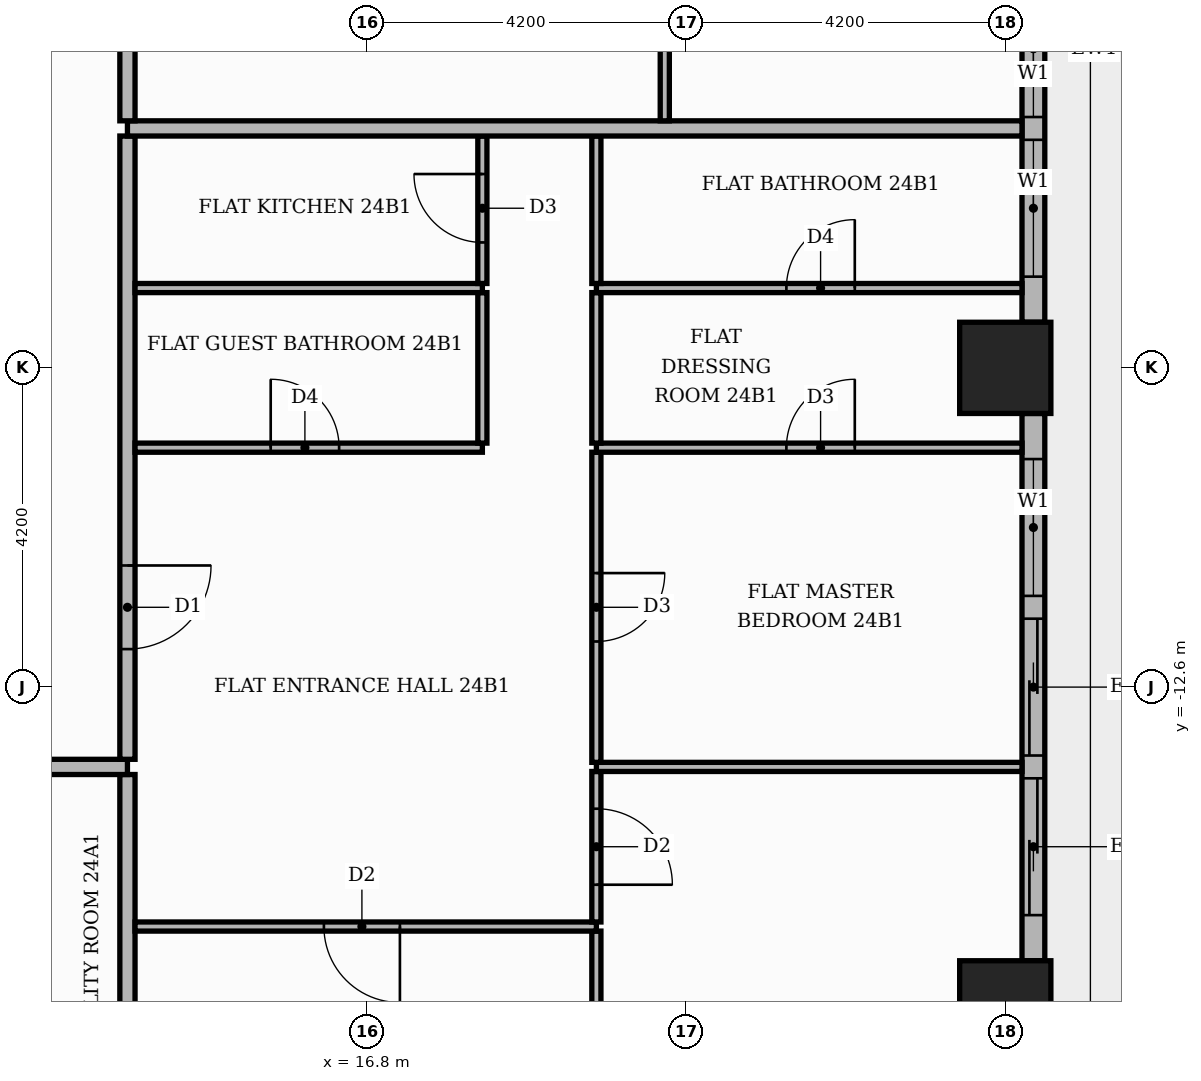
"""IFC4 building model, lengths in metres.
Left out: names, types, materials, properties, quantities, classifications, styles, units other than length and angle.
Written with IfcOpenShell. Run it as: python <this file> out.ifc"""

import sys

from ifc_helpers import new_model, si_unit, direction, frame, frame_2d, origin, origin_2d, place, context, subcontext, project, spatial, rectangle, extrude, element, fill, save


model = new_model("IFC4")
c1 = context("Model", 3, precision=1e-05, world=origin(), true_north=direction((0.0, 1.0)))
c2 = subcontext(c1, "Body", "Model", "MODEL_VIEW")
j1 = project(units=[si_unit("LENGTHUNIT", "METRE"), si_unit("PLANEANGLEUNIT", "RADIAN")], contexts=[c1])
p1 = place(None, origin())
s1 = spatial("IfcSite", under=j1, at=p1, CompositionType="ELEMENT")
p2 = place(p1, origin())
s2 = spatial("IfcBuilding", under=s1, at=p2, CompositionType="ELEMENT")
p3 = place(p2, frame((0.0, 0.0, 102.6)))
s3 = spatial("IfcBuildingStorey", under=s2, at=p3, CompositionType="ELEMENT", Elevation=102.6)
for number, where, z_axis, x_axis in (
    (1, (25.2, -8.4, 0.0), (0.0, 0.0, 1.0), (1.0, 0.0, 0.0)),
    (2, (25.2, -16.8, 0.0), (0.0, 0.0, 1.0), (1.0, 0.0, 0.0)),
):
    element("IfcColumn", number, at=place(p3, frame(where, z_axis=z_axis, x_axis=x_axis)), inside=s3, PredefinedType="COLUMN", context=c2, shape_type="SweptSolid", body=[
        extrude(rectangle(XDim=1.2, YDim=1.2, at=origin_2d()), origin(), (0.0, 0.0, 1.0), 3.9),
    ])
p4 = place(p3, frame((25.57, -16.2, 0.0), z_axis=(0.0, 0.0, 1.0), x_axis=(0.0, 1.0, 0.0)))
e3 = element("IfcWall", 3, at=p4, inside=s3, PredefinedType="STANDARD", context=c2, shape_type="SweptSolid", body=[
    extrude(rectangle(XDim=7.2, YDim=0.3, at=frame_2d((3.6, 0.0))), origin(), (0.0, 0.0, 1.0), 3.48),
])
p5 = place(p4, frame((0.6, 0.0, 0.0)))
e4 = element("IfcOpeningElement", 4, at=p5, cuts=e3, PredefinedType="OPENING", context=c2, shape_type="SweptSolid", body=[
    extrude(rectangle(XDim=1.8, YDim=2.4, at=frame_2d((0.9, 1.2))), frame((0.0, 0.16, 0.0), z_axis=(0.0, -1.0, 0.0), x_axis=(1.0, 0.0, 0.0)), (0.0, 0.0, 1.0), 0.32),
])
p6 = place(p4, frame((2.7, 0.0, 0.0)))
e5 = element("IfcOpeningElement", 5, at=p6, cuts=e3, PredefinedType="OPENING", context=c2, shape_type="SweptSolid", body=[
    extrude(rectangle(XDim=1.8, YDim=2.4, at=frame_2d((0.9, 1.2))), frame((0.0, 0.16, 0.0), z_axis=(0.0, -1.0, 0.0), x_axis=(1.0, 0.0, 0.0)), (0.0, 0.0, 1.0), 0.32),
])
p7 = place(p4, frame((4.8, 0.0, 0.9)))
e6 = element("IfcOpeningElement", 6, at=p7, cuts=e3, PredefinedType="OPENING", context=c2, shape_type="SweptSolid", body=[
    extrude(rectangle(XDim=1.8, YDim=2.1, at=frame_2d((0.9, 1.05))), frame((0.0, 0.16, 0.0), z_axis=(0.0, -1.0, 0.0), x_axis=(1.0, 0.0, 0.0)), (0.0, 0.0, 1.0), 0.32),
])
p8 = place(p3, frame((25.57, -7.8, 0.0), z_axis=(0.0, 0.0, 1.0), x_axis=(0.0, 1.0, 0.0)))
e7 = element("IfcWall", 7, at=p8, inside=s3, PredefinedType="STANDARD", context=c2, shape_type="SweptSolid", body=[
    extrude(rectangle(XDim=7.2, YDim=0.3, at=frame_2d((3.6, 0.0))), origin(), (0.0, 0.0, 1.0), 3.48),
])
p9 = place(p8, frame((0.6, 0.0, 0.9)))
e8 = element("IfcOpeningElement", 8, at=p9, cuts=e7, PredefinedType="OPENING", context=c2, shape_type="SweptSolid", body=[
    extrude(rectangle(XDim=1.8, YDim=2.1, at=frame_2d((0.9, 1.05))), frame((0.0, 0.16, 0.0), z_axis=(0.0, -1.0, 0.0), x_axis=(1.0, 0.0, 0.0)), (0.0, 0.0, 1.0), 0.32),
])
p10 = place(p8, frame((2.7, 0.0, 0.9)))
e9 = element("IfcOpeningElement", 9, at=p10, cuts=e7, PredefinedType="OPENING", context=c2, shape_type="SweptSolid", body=[
    extrude(rectangle(XDim=1.8, YDim=2.1, at=frame_2d((0.9, 1.05))), frame((0.0, 0.16, 0.0), z_axis=(0.0, -1.0, 0.0), x_axis=(1.0, 0.0, 0.0)), (0.0, 0.0, 1.0), 0.32),
])
p11 = place(p8, frame((4.8, 0.0, 0.0)))
e10 = element("IfcOpeningElement", 10, at=p11, cuts=e7, PredefinedType="OPENING", context=c2, shape_type="SweptSolid", body=[
    extrude(rectangle(XDim=1.8, YDim=2.4, at=frame_2d((0.9, 1.2))), frame((0.0, 0.16, 0.0), z_axis=(0.0, -1.0, 0.0), x_axis=(1.0, 0.0, 0.0)), (0.0, 0.0, 1.0), 0.32),
])
p12 = place(p3, frame((13.65, -25.42, 0.0), z_axis=(0.0, 0.0, 1.0), x_axis=(0.0, 1.0, 0.0)))
e11 = element("IfcWall", 11, at=p12, inside=s3, PredefinedType="PARTITIONING", context=c2, shape_type="SweptSolid", body=[
    extrude(rectangle(XDim=11.67, YDim=0.2, at=frame_2d((5.835, 0.0))), origin(), (0.0, 0.0, 1.0), 3.48),
])
p13 = place(p3, frame((19.82, -17.4, 0.0), z_axis=(0.0, 0.0, 1.0), x_axis=(0.0, 1.0, 0.0)))
e12 = element("IfcWall", 12, at=p13, inside=s3, PredefinedType="PARTITIONING", context=c2, shape_type="SweptSolid", body=[
    extrude(rectangle(XDim=1.59, YDim=0.12, at=frame_2d((0.795, 0.0))), origin(), (0.0, 0.0, 1.0), 3.48),
])
p14 = place(p3, frame((13.75, -15.75, 0.0), z_axis=(0.0, 0.0, 1.0), x_axis=(1.0, 0.0, 0.0)))
e13 = element("IfcWall", 13, at=p14, inside=s3, PredefinedType="PARTITIONING", context=c2, shape_type="SweptSolid", body=[
    extrude(rectangle(XDim=6.07, YDim=0.12, at=frame_2d((3.035, 0.0))), origin(), (0.0, 0.0, 1.0), 3.48),
])
p15 = place(p14, frame((2.485, 0.0, 0.0)))
e14 = element("IfcOpeningElement", 14, at=p15, cuts=e13, PredefinedType="OPENING", context=c2, shape_type="SweptSolid", body=[
    extrude(rectangle(XDim=1.0, YDim=2.1, at=frame_2d((0.5, 1.05))), frame((0.0, 0.07, 0.0), z_axis=(0.0, -1.0, 0.0), x_axis=(1.0, 0.0, 0.0)), (0.0, 0.0, 1.0), 0.14),
])
p16 = place(p3, frame((19.82, -15.69, 0.0), z_axis=(0.0, 0.0, 1.0), x_axis=(0.0, 1.0, 0.0)))
e15 = element("IfcWall", 15, at=p16, inside=s3, PredefinedType="PARTITIONING", context=c2, shape_type="SweptSolid", body=[
    extrude(rectangle(XDim=1.98, YDim=0.12, at=frame_2d((0.99, 0.0))), origin(), (0.0, 0.0, 1.0), 3.48),
])
p17 = place(p16, frame((0.49, 0.0, 0.0)))
e16 = element("IfcOpeningElement", 16, at=p17, cuts=e15, PredefinedType="OPENING", context=c2, shape_type="SweptSolid", body=[
    extrude(rectangle(XDim=1.0, YDim=2.1, at=frame_2d((0.5, 1.05))), frame((0.0, 0.07, 0.0), z_axis=(0.0, -1.0, 0.0), x_axis=(1.0, 0.0, 0.0)), (0.0, 0.0, 1.0), 0.14),
])
p18 = place(p3, frame((-25.42, -13.65, 0.0), z_axis=(0.0, 0.0, 1.0), x_axis=(1.0, 0.0, 0.0)))
e17 = element("IfcWall", 17, at=p18, inside=s3, PredefinedType="PARTITIONING", context=c2, shape_type="SweptSolid", body=[
    extrude(rectangle(XDim=39.07, YDim=0.2, at=frame_2d((19.535, 0.0))), origin(), (0.0, 0.0, 1.0), 3.48),
])
p19 = place(p18, frame((14.37, 0.0, 0.0)))
e18 = element("IfcOpeningElement", 18, at=p19, cuts=e17, PredefinedType="OPENING", context=c2, shape_type="SweptSolid", body=[
    extrude(rectangle(XDim=1.1, YDim=2.4, at=frame_2d((0.55, 1.2))), frame((0.0, 0.11, 0.0), z_axis=(0.0, -1.0, 0.0), x_axis=(1.0, 0.0, 0.0)), (0.0, 0.0, 1.0), 0.22),
])
p20 = place(p3, frame((19.82, -13.65, 0.0), z_axis=(0.0, 0.0, 1.0), x_axis=(1.0, 0.0, 0.0)))
e19 = element("IfcWall", 19, at=p20, inside=s3, PredefinedType="PARTITIONING", context=c2, shape_type="SweptSolid", body=[
    extrude(rectangle(XDim=5.6, YDim=0.12, at=frame_2d((2.8, 0.0))), origin(), (0.0, 0.0, 1.0), 3.48),
])
p21 = place(p3, frame((19.82, -13.59, 0.0), z_axis=(0.0, 0.0, 1.0), x_axis=(0.0, 1.0, 0.0)))
e20 = element("IfcWall", 20, at=p21, inside=s3, PredefinedType="PARTITIONING", context=c2, shape_type="SweptSolid", body=[
    extrude(rectangle(XDim=4.08, YDim=0.12, at=frame_2d((2.04, 0.0))), origin(), (0.0, 0.0, 1.0), 3.48),
])
p22 = place(p21, frame((1.59, 0.0, 0.0)))
e21 = element("IfcOpeningElement", 21, at=p22, cuts=e20, PredefinedType="OPENING", context=c2, shape_type="SweptSolid", body=[
    extrude(rectangle(XDim=0.9, YDim=2.1, at=frame_2d((0.45, 1.05))), frame((0.0, 0.07, 0.0), z_axis=(0.0, -1.0, 0.0), x_axis=(1.0, 0.0, 0.0)), (0.0, 0.0, 1.0), 0.14),
])
p23 = place(p3, frame((13.65, -13.55, 0.0), z_axis=(0.0, 0.0, 1.0), x_axis=(0.0, 1.0, 0.0)))
e22 = element("IfcWall", 22, at=p23, inside=s3, PredefinedType="PARTITIONING", context=c2, shape_type="SweptSolid", body=[
    extrude(rectangle(XDim=8.2, YDim=0.2, at=frame_2d((4.1, 0.0))), origin(), (0.0, 0.0, 1.0), 3.48),
])
p24 = place(p23, frame((1.45, 0.0, 0.0)))
e23 = element("IfcOpeningElement", 23, at=p24, cuts=e22, PredefinedType="OPENING", context=c2, shape_type="SweptSolid", body=[
    extrude(rectangle(XDim=1.1, YDim=2.4, at=frame_2d((0.55, 1.2))), frame((0.0, 0.11, 0.0), z_axis=(0.0, -1.0, 0.0), x_axis=(1.0, 0.0, 0.0)), (0.0, 0.0, 1.0), 0.22),
])
p25 = place(p3, frame((13.75, -9.45, 0.0), z_axis=(0.0, 0.0, 1.0), x_axis=(1.0, 0.0, 0.0)))
e24 = element("IfcWall", 24, at=p25, inside=s3, PredefinedType="PARTITIONING", context=c2, shape_type="SweptSolid", body=[
    extrude(rectangle(XDim=4.57, YDim=0.12, at=frame_2d((2.285, 0.0))), origin(), (0.0, 0.0, 1.0), 3.48),
])
p26 = place(p25, frame((1.785, 0.0, 0.0)))
e25 = element("IfcOpeningElement", 25, at=p26, cuts=e24, PredefinedType="OPENING", context=c2, shape_type="SweptSolid", body=[
    extrude(rectangle(XDim=0.9, YDim=2.1, at=frame_2d((0.45, 1.05))), frame((0.0, 0.07, 0.0), z_axis=(0.0, -1.0, 0.0), x_axis=(1.0, 0.0, 0.0)), (0.0, 0.0, 1.0), 0.14),
])
p27 = place(p3, frame((19.82, -9.45, 0.0), z_axis=(0.0, 0.0, 1.0), x_axis=(1.0, 0.0, 0.0)))
e26 = element("IfcWall", 26, at=p27, inside=s3, PredefinedType="PARTITIONING", context=c2, shape_type="SweptSolid", body=[
    extrude(rectangle(XDim=5.6, YDim=0.12, at=frame_2d((2.8, 0.0))), origin(), (0.0, 0.0, 1.0), 3.48),
])
p28 = place(p27, frame((2.5, 0.0, 0.0)))
e27 = element("IfcOpeningElement", 27, at=p28, cuts=e26, PredefinedType="OPENING", context=c2, shape_type="SweptSolid", body=[
    extrude(rectangle(XDim=0.9, YDim=2.1, at=frame_2d((0.45, 1.05))), frame((0.0, 0.07, 0.0), z_axis=(0.0, -1.0, 0.0), x_axis=(1.0, 0.0, 0.0)), (0.0, 0.0, 1.0), 0.14),
])
for number, where, z_axis, x_axis in (
    (28, (18.32, -9.39, 0.0), (0.0, 0.0, 1.0), (0.0, 1.0, 0.0)),
    (29, (19.82, -9.39, 0.0), (0.0, 0.0, 1.0), (0.0, 1.0, 0.0)),
):
    element("IfcWall", number, at=place(p3, frame(where, z_axis=z_axis, x_axis=x_axis)), inside=s3, PredefinedType="PARTITIONING", context=c2, shape_type="SweptSolid", body=[
        extrude(rectangle(XDim=1.98, YDim=0.12, at=frame_2d((0.99, 0.0))), origin(), (0.0, 0.0, 1.0), 3.48),
    ])
p29 = place(p3, frame((13.75, -7.35, 0.0), z_axis=(0.0, 0.0, 1.0), x_axis=(1.0, 0.0, 0.0)))
e30 = element("IfcWall", 30, at=p29, inside=s3, PredefinedType="PARTITIONING", context=c2, shape_type="SweptSolid", body=[
    extrude(rectangle(XDim=4.57, YDim=0.12, at=frame_2d((2.285, 0.0))), origin(), (0.0, 0.0, 1.0), 3.48),
])
p30 = place(p3, frame((19.82, -7.35, 0.0), z_axis=(0.0, 0.0, 1.0), x_axis=(1.0, 0.0, 0.0)))
e31 = element("IfcWall", 31, at=p30, inside=s3, PredefinedType="PARTITIONING", context=c2, shape_type="SweptSolid", body=[
    extrude(rectangle(XDim=5.6, YDim=0.12, at=frame_2d((2.8, 0.0))), origin(), (0.0, 0.0, 1.0), 3.48),
])
p31 = place(p30, frame((2.5, 0.0, 0.0)))
e32 = element("IfcOpeningElement", 32, at=p31, cuts=e31, PredefinedType="OPENING", context=c2, shape_type="SweptSolid", body=[
    extrude(rectangle(XDim=0.9, YDim=2.1, at=frame_2d((0.45, 1.05))), frame((0.0, 0.07, 0.0), z_axis=(0.0, -1.0, 0.0), x_axis=(1.0, 0.0, 0.0)), (0.0, 0.0, 1.0), 0.14),
])
p32 = place(p3, frame((18.32, -7.29, 0.0), z_axis=(0.0, 0.0, 1.0), x_axis=(0.0, 1.0, 0.0)))
e33 = element("IfcWall", 33, at=p32, inside=s3, PredefinedType="PARTITIONING", context=c2, shape_type="SweptSolid", body=[
    extrude(rectangle(XDim=1.94, YDim=0.12, at=frame_2d((0.97, 0.0))), origin(), (0.0, 0.0, 1.0), 3.48),
])
p33 = place(p32, frame((0.54, 0.0, 0.0)))
e34 = element("IfcOpeningElement", 34, at=p33, cuts=e33, PredefinedType="OPENING", context=c2, shape_type="SweptSolid", body=[
    extrude(rectangle(XDim=0.9, YDim=2.1, at=frame_2d((0.45, 1.05))), frame((0.0, 0.07, 0.0), z_axis=(0.0, -1.0, 0.0), x_axis=(1.0, 0.0, 0.0)), (0.0, 0.0, 1.0), 0.14),
])
p34 = place(p3, frame((19.82, -7.29, 0.0), z_axis=(0.0, 0.0, 1.0), x_axis=(0.0, 1.0, 0.0)))
e35 = element("IfcWall", 35, at=p34, inside=s3, PredefinedType="PARTITIONING", context=c2, shape_type="SweptSolid", body=[
    extrude(rectangle(XDim=1.94, YDim=0.12, at=frame_2d((0.97, 0.0))), origin(), (0.0, 0.0, 1.0), 3.48),
])
p35 = place(p3, frame((13.65, -5.25, 0.0), z_axis=(0.0, 0.0, 1.0), x_axis=(1.0, 0.0, 0.0)))
e36 = element("IfcWall", 36, at=p35, inside=s3, PredefinedType="PARTITIONING", context=c2, shape_type="SweptSolid", body=[
    extrude(rectangle(XDim=11.77, YDim=0.2, at=frame_2d((5.885, 0.0))), origin(), (0.0, 0.0, 1.0), 3.48),
])
p36 = place(p3, frame((13.65, -5.15, 0.0), z_axis=(0.0, 0.0, 1.0), x_axis=(0.0, 1.0, 0.0)))
e37 = element("IfcWall", 37, at=p36, inside=s3, PredefinedType="PARTITIONING", context=c2, shape_type="SweptSolid", body=[
    extrude(rectangle(XDim=18.7, YDim=0.2, at=frame_2d((9.35, 0.0))), origin(), (0.0, 0.0, 1.0), 3.48),
])
p37 = place(p36, frame((1.45, 0.0, 0.0)))
e38 = element("IfcOpeningElement", 38, at=p37, cuts=e37, PredefinedType="OPENING", context=c2, shape_type="SweptSolid", body=[
    extrude(rectangle(XDim=1.1, YDim=2.4, at=frame_2d((0.55, 1.2))), frame((0.0, 0.11, 0.0), z_axis=(0.0, -1.0, 0.0), x_axis=(1.0, 0.0, 0.0)), (0.0, 0.0, 1.0), 0.22),
])
p38 = place(p3, frame((20.72, -5.15, 0.0), z_axis=(0.0, 0.0, 1.0), x_axis=(0.0, 1.0, 0.0)))
e39 = element("IfcWall", 39, at=p38, inside=s3, PredefinedType="PARTITIONING", context=c2, shape_type="SweptSolid", body=[
    extrude(rectangle(XDim=6.14, YDim=0.12, at=frame_2d((3.07, 0.0))), origin(), (0.0, 0.0, 1.0), 3.48),
])
p39 = place(p38, frame((2.55, 0.0, 0.0)))
e40 = element("IfcOpeningElement", 40, at=p39, cuts=e39, PredefinedType="OPENING", context=c2, shape_type="SweptSolid", body=[
    extrude(rectangle(XDim=1.0, YDim=2.1, at=frame_2d((0.5, 1.05))), frame((0.0, 0.07, 0.0), z_axis=(0.0, -1.0, 0.0), x_axis=(1.0, 0.0, 0.0)), (0.0, 0.0, 1.0), 0.14),
])
p40 = place(p5, origin())
e41 = element("IfcDoor", 41, at=p40, inside=s3, OperationType="SLIDING_TO_LEFT", PredefinedType="DOOR", context=c2, shape_type="SweptSolid", body=[
    extrude(rectangle(XDim=1.8, YDim=2.4, at=frame_2d((0.9, 1.2))), frame((0.0, 0.025, 0.0), z_axis=(0.0, -1.0, 0.0), x_axis=(1.0, 0.0, 0.0)), (0.0, 0.0, 1.0), 0.05),
])
fill(e4, e41)
p41 = place(p6, origin())
e42 = element("IfcDoor", 42, at=p41, inside=s3, OperationType="SLIDING_TO_RIGHT", PredefinedType="DOOR", context=c2, shape_type="SweptSolid", body=[
    extrude(rectangle(XDim=1.8, YDim=2.4, at=frame_2d((0.9, 1.2))), frame((0.0, 0.025, 0.0), z_axis=(0.0, -1.0, 0.0), x_axis=(1.0, 0.0, 0.0)), (0.0, 0.0, 1.0), 0.05),
])
fill(e5, e42)
p42 = place(p7, origin())
e43 = element("IfcWindow", 43, at=p42, inside=s3, PartitioningType="SINGLE_PANEL", PredefinedType="WINDOW", context=c2, shape_type="SweptSolid", body=[
    extrude(rectangle(XDim=1.8, YDim=2.1, at=frame_2d((0.9, 1.05))), frame((0.0, 0.03, 0.0), z_axis=(0.0, -1.0, 0.0), x_axis=(1.0, 0.0, 0.0)), (0.0, 0.0, 1.0), 0.06),
])
fill(e6, e43)
p43 = place(p9, origin())
e44 = element("IfcWindow", 44, at=p43, inside=s3, PartitioningType="SINGLE_PANEL", PredefinedType="WINDOW", context=c2, shape_type="SweptSolid", body=[
    extrude(rectangle(XDim=1.8, YDim=2.1, at=frame_2d((0.9, 1.05))), frame((0.0, 0.03, 0.0), z_axis=(0.0, -1.0, 0.0), x_axis=(1.0, 0.0, 0.0)), (0.0, 0.0, 1.0), 0.06),
])
fill(e8, e44)
p44 = place(p10, origin())
e45 = element("IfcWindow", 45, at=p44, inside=s3, PartitioningType="SINGLE_PANEL", PredefinedType="WINDOW", context=c2, shape_type="SweptSolid", body=[
    extrude(rectangle(XDim=1.8, YDim=2.1, at=frame_2d((0.9, 1.05))), frame((0.0, 0.03, 0.0), z_axis=(0.0, -1.0, 0.0), x_axis=(1.0, 0.0, 0.0)), (0.0, 0.0, 1.0), 0.06),
])
fill(e9, e45)
p45 = place(p24, frame((1.1, 0.0, 0.0), z_axis=(0.0, 0.0, 1.0), x_axis=(-1.0, 0.0, 0.0)))
e46 = element("IfcDoor", 46, at=p45, inside=s3, OperationType="SINGLE_SWING_RIGHT", PredefinedType="DOOR", context=c2, shape_type="SweptSolid", body=[
    extrude(rectangle(XDim=1.1, YDim=2.4, at=frame_2d((0.55, 1.2))), frame((0.0, 0.025, 0.0), z_axis=(0.0, -1.0, 0.0), x_axis=(1.0, 0.0, 0.0)), (0.0, 0.0, 1.0), 0.05),
])
fill(e23, e46)
p46 = place(p15, frame((1.0, 0.0, 0.0), z_axis=(0.0, 0.0, 1.0), x_axis=(-1.0, 0.0, 0.0)))
e47 = element("IfcDoor", 47, at=p46, inside=s3, OperationType="SINGLE_SWING_RIGHT", PredefinedType="DOOR", context=c2, shape_type="SweptSolid", body=[
    extrude(rectangle(XDim=1.0, YDim=2.1, at=frame_2d((0.5, 1.05))), frame((0.0, 0.025, 0.0), z_axis=(0.0, -1.0, 0.0), x_axis=(1.0, 0.0, 0.0)), (0.0, 0.0, 1.0), 0.05),
])
fill(e14, e47)
p47 = place(p26, origin())
e48 = element("IfcDoor", 48, at=p47, inside=s3, OperationType="SINGLE_SWING_LEFT", PredefinedType="DOOR", context=c2, shape_type="SweptSolid", body=[
    extrude(rectangle(XDim=0.9, YDim=2.1, at=frame_2d((0.45, 1.05))), frame((0.0, 0.025, 0.0), z_axis=(0.0, -1.0, 0.0), x_axis=(1.0, 0.0, 0.0)), (0.0, 0.0, 1.0), 0.05),
])
fill(e25, e48)
p48 = place(p33, origin())
e49 = element("IfcDoor", 49, at=p48, inside=s3, OperationType="SINGLE_SWING_RIGHT", PredefinedType="DOOR", context=c2, shape_type="SweptSolid", body=[
    extrude(rectangle(XDim=0.9, YDim=2.1, at=frame_2d((0.45, 1.05))), frame((0.0, 0.025, 0.0), z_axis=(0.0, -1.0, 0.0), x_axis=(1.0, 0.0, 0.0)), (0.0, 0.0, 1.0), 0.05),
])
fill(e34, e49)
p49 = place(p17, frame((1.0, 0.0, 0.0), z_axis=(0.0, 0.0, 1.0), x_axis=(-1.0, 0.0, 0.0)))
e50 = element("IfcDoor", 50, at=p49, inside=s3, OperationType="SINGLE_SWING_LEFT", PredefinedType="DOOR", context=c2, shape_type="SweptSolid", body=[
    extrude(rectangle(XDim=1.0, YDim=2.1, at=frame_2d((0.5, 1.05))), frame((0.0, 0.025, 0.0), z_axis=(0.0, -1.0, 0.0), x_axis=(1.0, 0.0, 0.0)), (0.0, 0.0, 1.0), 0.05),
])
fill(e16, e50)
p50 = place(p22, frame((0.9, 0.0, 0.0), z_axis=(0.0, 0.0, 1.0), x_axis=(-1.0, 0.0, 0.0)))
e51 = element("IfcDoor", 51, at=p50, inside=s3, OperationType="SINGLE_SWING_RIGHT", PredefinedType="DOOR", context=c2, shape_type="SweptSolid", body=[
    extrude(rectangle(XDim=0.9, YDim=2.1, at=frame_2d((0.45, 1.05))), frame((0.0, 0.025, 0.0), z_axis=(0.0, -1.0, 0.0), x_axis=(1.0, 0.0, 0.0)), (0.0, 0.0, 1.0), 0.05),
])
fill(e21, e51)
p51 = place(p28, origin())
e52 = element("IfcDoor", 52, at=p51, inside=s3, OperationType="SINGLE_SWING_RIGHT", PredefinedType="DOOR", context=c2, shape_type="SweptSolid", body=[
    extrude(rectangle(XDim=0.9, YDim=2.1, at=frame_2d((0.45, 1.05))), frame((0.0, 0.025, 0.0), z_axis=(0.0, -1.0, 0.0), x_axis=(1.0, 0.0, 0.0)), (0.0, 0.0, 1.0), 0.05),
])
fill(e27, e52)
p52 = place(p31, origin())
e53 = element("IfcDoor", 53, at=p52, inside=s3, OperationType="SINGLE_SWING_RIGHT", PredefinedType="DOOR", context=c2, shape_type="SweptSolid", body=[
    extrude(rectangle(XDim=0.9, YDim=2.1, at=frame_2d((0.45, 1.05))), frame((0.0, 0.025, 0.0), z_axis=(0.0, -1.0, 0.0), x_axis=(1.0, 0.0, 0.0)), (0.0, 0.0, 1.0), 0.05),
])
fill(e32, e53)
save(model, sys.argv[1])
